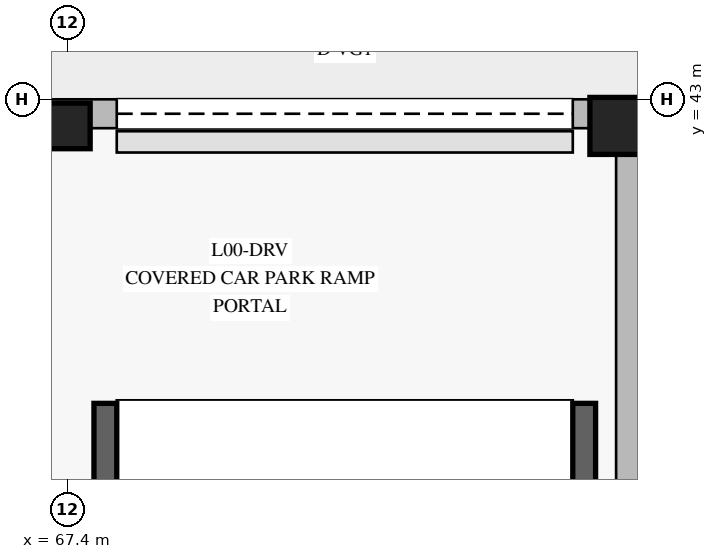
"""IFC4 building model, lengths in metres.
Left out: names, types, materials, properties, quantities, classifications, styles, units other than length and angle.
Written with IfcOpenShell. Run it as: python <this file> out.ifc"""

import sys

from ifc_helpers import new_model, si_unit, direction, frame, frame_2d, origin, origin_2d, place, context, subcontext, project, spatial, rectangle, extrude, element, fill, save


model = new_model("IFC4")
c1 = context("Model", 3, precision=1e-05, world=origin(), true_north=direction((0.0, 1.0)))
c2 = subcontext(c1, "Body", "Model", "MODEL_VIEW")
j1 = project(units=[si_unit("LENGTHUNIT", "METRE"), si_unit("PLANEANGLEUNIT", "RADIAN")], contexts=[c1])
p1 = place(None, origin())
s1 = spatial("IfcSite", under=j1, at=p1, CompositionType="ELEMENT")
p2 = place(p1, origin())
s2 = spatial("IfcBuilding", under=s1, at=p2, CompositionType="ELEMENT")
p3 = place(p2, origin())
s3 = spatial("IfcBuildingStorey", under=s2, at=p3, CompositionType="ELEMENT", Elevation=0.0)
for number, where, z_axis, x_axis in (
    (1, (67.9, 10.5, 0.0), (0.0, 0.0, 1.0), (0.0, 1.0, 0.0)),
    (2, (74.2, 10.5, 0.0), (0.0, 0.0, 1.0), (0.0, 1.0, 0.0)),
):
    element("IfcWall", number, at=place(p3, frame(where, z_axis=z_axis, x_axis=x_axis)), inside=s3, PredefinedType="SOLIDWALL", context=c2, shape_type="SweptSolid", body=[
        extrude(rectangle(XDim=28.5, YDim=0.3, at=frame_2d((14.25, 0.0))), origin(), (0.0, 0.0, 1.0), 4.94),
    ])
p4 = place(p3, frame((67.4, 42.65, 0.0), z_axis=(0.0, 0.0, 1.0), x_axis=(1.0, 0.0, 0.0)))
e3 = element("IfcColumn", 3, at=p4, inside=s3, PredefinedType="COLUMN", context=c2, shape_type="SweptSolid", body=[
    extrude(rectangle(XDim=0.6, YDim=0.6, at=origin_2d()), origin(), (0.0, 0.0, 1.0), 5.2),
])
p5 = place(p3, frame((74.65, 42.65, 0.0), z_axis=(0.0, 0.0, 1.0), x_axis=(1.0, 0.0, 0.0)))
e4 = element("IfcColumn", 4, at=p5, inside=s3, PredefinedType="COLUMN", context=c2, shape_type="SweptSolid", body=[
    extrude(rectangle(XDim=0.75, YDim=0.75, at=origin_2d()), origin(), (0.0, 0.0, 1.0), 5.2),
])
p6 = place(p3, frame((52.0, 42.81, 0.0), z_axis=(0.0, 0.0, 1.0), x_axis=(1.0, 0.0, 0.0)))
e5 = element("IfcWall", 5, at=p6, inside=s3, PredefinedType="STANDARD", context=c2, shape_type="SweptSolid", body=[
    extrude(rectangle(XDim=23.0, YDim=0.38, at=frame_2d((11.5, 0.0))), origin(), (0.0, 0.0, 1.0), 4.94),
])
p7 = place(p6, frame((2.05, 0.0, 0.0)))
e6 = element("IfcOpeningElement", 6, at=p7, cuts=e5, PredefinedType="OPENING", context=c2, shape_type="SweptSolid", body=[
    extrude(rectangle(XDim=2.0, YDim=2.4, at=frame_2d((1.0, 1.2))), frame((0.0, 0.2, 0.0), z_axis=(0.0, -1.0, 0.0), x_axis=(1.0, 0.0, 0.0)), (0.0, 0.0, 1.0), 0.4),
])
p8 = place(p6, frame((16.05, 0.0, 0.0)))
e7 = element("IfcOpeningElement", 7, at=p8, cuts=e5, PredefinedType="OPENING", context=c2, shape_type="SweptSolid", body=[
    extrude(rectangle(XDim=6.0, YDim=2.6, at=frame_2d((3.0, 1.3))), frame((0.0, 0.2, 0.0), z_axis=(0.0, -1.0, 0.0), x_axis=(1.0, 0.0, 0.0)), (0.0, 0.0, 1.0), 0.4),
])
p9 = place(p3, frame((74.81, 42.62, 0.0), z_axis=(0.0, 0.0, 1.0), x_axis=(0.0, -1.0, 0.0)))
e8 = element("IfcWall", 8, at=p9, inside=s3, PredefinedType="STANDARD", context=c2, shape_type="SweptSolid", body=[
    extrude(rectangle(XDim=35.24, YDim=0.38, at=frame_2d((17.62, 0.0))), origin(), (0.0, 0.0, 1.0), 4.94),
])
p10 = place(p8, origin())
e9 = element("IfcDoor", 9, at=p10, inside=s3, OperationType="ROLLINGUP", PredefinedType="GATE", context=c2, shape_type="SweptSolid", body=[
    extrude(rectangle(XDim=6.0, YDim=2.6, at=frame_2d((3.0, 1.3))), frame((0.0, 0.025, 0.0), z_axis=(0.0, -1.0, 0.0), x_axis=(1.0, 0.0, 0.0)), (0.0, 0.0, 1.0), 0.05),
])
fill(e7, e9)
save(model, sys.argv[1])
